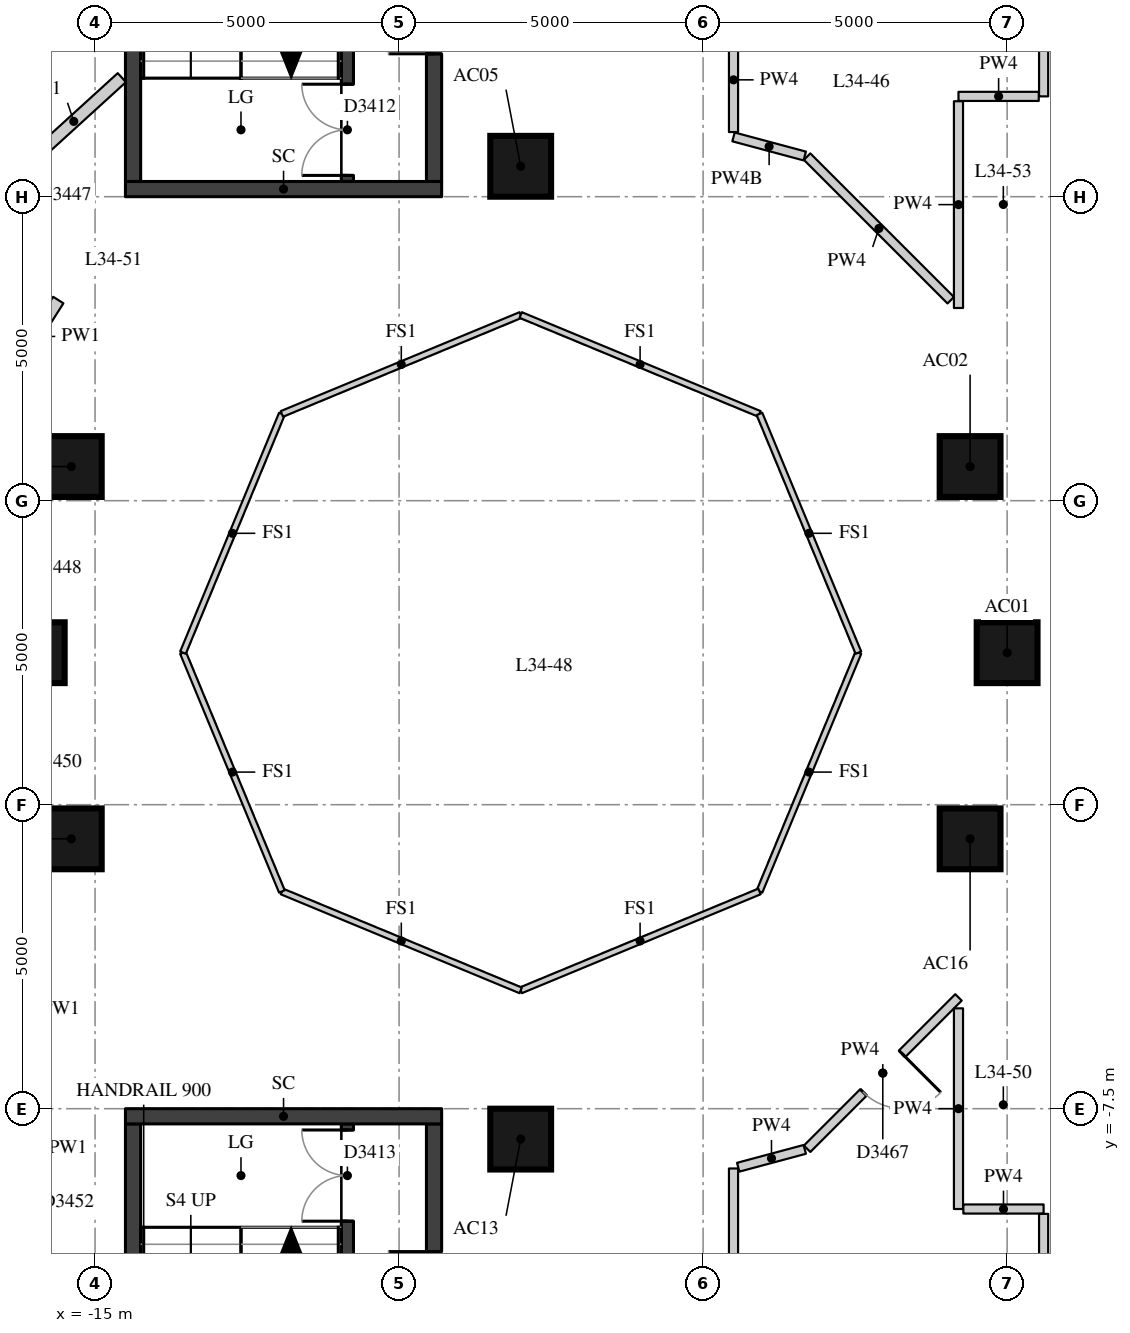
"""IFC4 building model, lengths in metres.
Left out: names, types, materials, properties, quantities, classifications, styles, units other than length and angle.
Written with IfcOpenShell. Run it as: python <this file> out.ifc"""

import sys

from ifc_helpers import new_model, si_unit, direction, frame, frame_2d, origin, origin_2d, place, context, subcontext, project, spatial, rectangle, extrude, element, fill, save


model = new_model("IFC4")
c1 = context("Model", 3, precision=1e-05, world=origin(), true_north=direction((0.0, 1.0)))
c2 = subcontext(c1, "Body", "Model", "MODEL_VIEW")
j1 = project(units=[si_unit("LENGTHUNIT", "METRE"), si_unit("PLANEANGLEUNIT", "RADIAN")], contexts=[c1])
p1 = place(None, origin())
s1 = spatial("IfcSite", under=j1, at=p1, CompositionType="ELEMENT")
p2 = place(p1, origin())
s2 = spatial("IfcBuilding", under=s1, at=p2, CompositionType="ELEMENT")
p3 = place(p2, frame((0.0, 0.0, 121.9)))
s3 = spatial("IfcBuildingStorey", under=s2, at=p3, CompositionType="ELEMENT", Elevation=121.9)
for number, where, z_axis, x_axis in (
    (1, (0.0, 0.0, 0.0), (0.0, 0.0, 1.0), (1.0, 0.0, 0.0)),
    (2, (-0.609, 3.062, 0.0), (0.0, 0.0, 1.0), (1.0, 0.0, 0.0)),
    (3, (-8.0, 8.0, 0.0), (0.0, 0.0, 1.0), (1.0, 0.0, 0.0)),
    (4, (-15.391, 3.062, 0.0), (0.0, 0.0, 1.0), (1.0, 0.0, 0.0)),
    (5, (-16.0, 0.0, 0.0), (0.0, 0.0, 1.0), (1.0, 0.0, 0.0)),
    (6, (-15.391, -3.062, 0.0), (0.0, 0.0, 1.0), (1.0, 0.0, 0.0)),
    (7, (-8.0, -8.0, 0.0), (0.0, 0.0, 1.0), (1.0, 0.0, 0.0)),
    (8, (-0.609, -3.062, 0.0), (0.0, 0.0, 1.0), (1.0, 0.0, 0.0)),
):
    element("IfcColumn", number, at=place(p3, frame(where, z_axis=z_axis, x_axis=x_axis)), inside=s3, PredefinedType="COLUMN", context=c2, shape_type="SweptSolid", body=[
        extrude(rectangle(XDim=1.0, YDim=1.0, at=origin_2d()), origin(), (0.0, 0.0, 1.0), 3.3),
    ])
p4 = place(p3, frame((-10.85, 7.75, 0.0), z_axis=(0.0, 0.0, 1.0), x_axis=(0.0, 1.0, 0.0)))
e9 = element("IfcWall", 9, at=p4, inside=s3, PredefinedType="SHEAR", context=c2, shape_type="SweptSolid", body=[
    extrude(rectangle(XDim=6.0, YDim=0.2, at=frame_2d((3.0, 0.0))), origin(), (0.0, 0.0, 1.0), 3.02),
])
p5 = place(p4, frame((0.1, 0.0, 0.0)))
e10 = element("IfcOpeningElement", 10, at=p5, cuts=e9, PredefinedType="OPENING", context=c2, shape_type="SweptSolid", body=[
    extrude(rectangle(XDim=1.5, YDim=2.1, at=frame_2d((0.75, 1.05))), frame((0.0, 0.11, 0.0), z_axis=(0.0, -1.0, 0.0), x_axis=(1.0, 0.0, 0.0)), (0.0, 0.0, 1.0), 0.22),
])
p6 = place(p3, frame((-10.85, -13.75, 0.0), z_axis=(0.0, 0.0, 1.0), x_axis=(0.0, 1.0, 0.0)))
e11 = element("IfcWall", 11, at=p6, inside=s3, PredefinedType="SHEAR", context=c2, shape_type="SweptSolid", body=[
    extrude(rectangle(XDim=6.0, YDim=0.2, at=frame_2d((3.0, 0.0))), origin(), (0.0, 0.0, 1.0), 3.02),
])
p7 = place(p6, frame((4.4, 0.0, 0.0)))
e12 = element("IfcOpeningElement", 12, at=p7, cuts=e11, PredefinedType="OPENING", context=c2, shape_type="SweptSolid", body=[
    extrude(rectangle(XDim=1.5, YDim=2.1, at=frame_2d((0.75, 1.05))), frame((0.0, 0.11, 0.0), z_axis=(0.0, -1.0, 0.0), x_axis=(1.0, 0.0, 0.0)), (0.0, 0.0, 1.0), 0.22),
])
p8 = place(p3, frame((-14.375, 7.75, -0.28), z_axis=(0.0, 0.0, 1.0), x_axis=(0.0, 1.0, 0.0)))
e13 = element("IfcWall", 13, at=p8, inside=s3, PredefinedType="SHEAR", context=c2, shape_type="SweptSolid", body=[
    extrude(rectangle(XDim=6.0, YDim=0.25, at=frame_2d((3.0, 0.0))), origin(), (0.0, 0.0, 1.0), 3.3),
])
p9 = place(p3, frame((-9.425, 7.75, -0.28), z_axis=(0.0, 0.0, 1.0), x_axis=(0.0, 1.0, 0.0)))
e14 = element("IfcWall", 14, at=p9, inside=s3, PredefinedType="SHEAR", context=c2, shape_type="SweptSolid", body=[
    extrude(rectangle(XDim=6.0, YDim=0.25, at=frame_2d((3.0, 0.0))), origin(), (0.0, 0.0, 1.0), 3.3),
])
p10 = place(p9, frame((2.1, 0.0, 0.28)))
e15 = element("IfcOpeningElement", 15, at=p10, cuts=e14, PredefinedType="OPENING", context=c2, shape_type="SweptSolid", body=[
    extrude(rectangle(XDim=1.5, YDim=2.1, at=frame_2d((0.75, 1.05))), frame((0.0, 0.135, 0.0), z_axis=(0.0, -1.0, 0.0), x_axis=(1.0, 0.0, 0.0)), (0.0, 0.0, 1.0), 0.27),
])
p11 = place(p3, frame((-14.5, 7.625, -0.28), z_axis=(0.0, 0.0, 1.0), x_axis=(1.0, 0.0, 0.0)))
e16 = element("IfcWall", 16, at=p11, inside=s3, PredefinedType="SHEAR", context=c2, shape_type="SweptSolid", body=[
    extrude(rectangle(XDim=5.2, YDim=0.25, at=frame_2d((2.6, 0.0))), origin(), (0.0, 0.0, 1.0), 3.3),
])
p12 = place(p3, frame((-14.375, -13.75, -0.28), z_axis=(0.0, 0.0, 1.0), x_axis=(0.0, 1.0, 0.0)))
e17 = element("IfcWall", 17, at=p12, inside=s3, PredefinedType="SHEAR", context=c2, shape_type="SweptSolid", body=[
    extrude(rectangle(XDim=6.0, YDim=0.25, at=frame_2d((3.0, 0.0))), origin(), (0.0, 0.0, 1.0), 3.3),
])
p13 = place(p3, frame((-9.425, -13.75, -0.28), z_axis=(0.0, 0.0, 1.0), x_axis=(0.0, 1.0, 0.0)))
e18 = element("IfcWall", 18, at=p13, inside=s3, PredefinedType="SHEAR", context=c2, shape_type="SweptSolid", body=[
    extrude(rectangle(XDim=6.0, YDim=0.25, at=frame_2d((3.0, 0.0))), origin(), (0.0, 0.0, 1.0), 3.3),
])
p14 = place(p13, frame((2.4, 0.0, 0.28)))
e19 = element("IfcOpeningElement", 19, at=p14, cuts=e18, PredefinedType="OPENING", context=c2, shape_type="SweptSolid", body=[
    extrude(rectangle(XDim=1.5, YDim=2.1, at=frame_2d((0.75, 1.05))), frame((0.0, 0.135, 0.0), z_axis=(0.0, -1.0, 0.0), x_axis=(1.0, 0.0, 0.0)), (0.0, 0.0, 1.0), 0.27),
])
p15 = place(p3, frame((-14.5, -7.625, -0.28), z_axis=(0.0, 0.0, 1.0), x_axis=(1.0, 0.0, 0.0)))
e20 = element("IfcWall", 20, at=p15, inside=s3, PredefinedType="SHEAR", context=c2, shape_type="SweptSolid", body=[
    extrude(rectangle(XDim=5.2, YDim=0.25, at=frame_2d((2.6, 0.0))), origin(), (0.0, 0.0, 1.0), 3.3),
])
p16 = place(p3, frame((-16.366, 4.604, 0.0), z_axis=(0.0, 0.0, 1.0), x_axis=(0.536775234189, 0.843725279911, 0.0)))
e21 = element("IfcWall", 21, at=p16, inside=s3, PredefinedType="PARTITIONING", context=c2, shape_type="SweptSolid", body=[
    extrude(rectangle(XDim=1.418, YDim=0.2, at=frame_2d((0.709, 0.0))), origin(), (0.0, 0.0, 1.0), 3.02),
])
p17 = place(p3, frame((-16.14, 8.019, 0.0), z_axis=(0.0, 0.0, 1.0), x_axis=(0.739392120684, 0.673275049197, 0.0)))
e22 = element("IfcWall", 22, at=p17, inside=s3, PredefinedType="PARTITIONING", context=c2, shape_type="SweptSolid", body=[
    extrude(rectangle(XDim=2.138, YDim=0.2, at=frame_2d((1.069, 0.0))), origin(), (0.0, 0.0, 1.0), 3.02),
])
p18 = place(p3, frame((0.6, 11.917, 0.0), z_axis=(0.0, 0.0, 1.0), x_axis=(0.0, -1.0, 0.0)))
e23 = element("IfcWall", 23, at=p18, inside=s3, PredefinedType="PARTITIONING", context=c2, shape_type="SweptSolid", body=[
    extrude(rectangle(XDim=2.767, YDim=0.15, at=frame_2d((1.384, 0.0))), origin(), (0.0, 0.0, 1.0), 3.02),
])
p19 = place(p3, frame((0.52, 9.15, 0.0), z_axis=(0.0, 0.0, 1.0), x_axis=(-1.0, 0.0, 0.0)))
e24 = element("IfcWall", 24, at=p19, inside=s3, PredefinedType="PARTITIONING", context=c2, shape_type="SweptSolid", body=[
    extrude(rectangle(XDim=1.32, YDim=0.15, at=frame_2d((0.66, 0.0))), origin(), (0.0, 0.0, 1.0), 3.02),
])
p20 = place(p3, frame((-0.8, 9.07, 0.0), z_axis=(0.0, 0.0, 1.0), x_axis=(0.0, -1.0, 0.0)))
e25 = element("IfcWall", 25, at=p20, inside=s3, PredefinedType="PARTITIONING", context=c2, shape_type="SweptSolid", body=[
    extrude(rectangle(XDim=3.4, YDim=0.15, at=frame_2d((1.7, 0.0))), origin(), (0.0, 0.0, 1.0), 3.02),
])
p21 = place(p3, frame((-0.927, 5.797, 0.0), z_axis=(0.0, 0.0, 1.0), x_axis=(-0.707106781187, 0.707106781187, 0.0)))
e26 = element("IfcWall", 26, at=p21, inside=s3, PredefinedType="PARTITIONING", context=c2, shape_type="SweptSolid", body=[
    extrude(rectangle(XDim=3.341, YDim=0.15, at=frame_2d((1.67, 0.0))), origin(), (0.0, 0.0, 1.0), 3.02),
])
p22 = place(p3, frame((-3.328, 8.169, 0.0), z_axis=(0.0, 0.0, 1.0), x_axis=(-0.965933680277, 0.258789731841, 0.0)))
e27 = element("IfcWall", 27, at=p22, inside=s3, PredefinedType="PARTITIONING", context=c2, shape_type="SweptSolid", body=[
    extrude(rectangle(XDim=1.213, YDim=0.15, at=frame_2d((0.606, 0.0))), origin(), (0.0, 0.0, 1.0), 2.47),
])
p23 = place(p3, frame((-4.5, 8.563, 0.0), z_axis=(0.0, 0.0, 1.0), x_axis=(0.0, 1.0, 0.0)))
e28 = element("IfcWall", 28, at=p23, inside=s3, PredefinedType="PARTITIONING", context=c2, shape_type="SweptSolid", body=[
    extrude(rectangle(XDim=1.717, YDim=0.15, at=frame_2d((0.859, 0.0))), origin(), (0.0, 0.0, 1.0), 3.02),
])
p24 = place(p3, frame((-3.29, -8.159, 0.0), z_axis=(0.0, 0.0, 1.0), x_axis=(0.707106781187, 0.707106781187, 0.0)))
e29 = element("IfcWall", 29, at=p24, inside=s3, PredefinedType="PARTITIONING", context=c2, shape_type="SweptSolid", body=[
    extrude(rectangle(XDim=3.521, YDim=0.15, at=frame_2d((1.76, 0.0))), origin(), (0.0, 0.0, 1.0), 3.02),
])
p25 = place(p24, frame((1.31, 0.0, 0.0)))
e30 = element("IfcOpeningElement", 30, at=p25, cuts=e29, PredefinedType="OPENING", context=c2, shape_type="SweptSolid", body=[
    extrude(rectangle(XDim=0.9, YDim=2.1, at=frame_2d((0.45, 1.05))), frame((0.0, 0.085, 0.0), z_axis=(0.0, -1.0, 0.0), x_axis=(1.0, 0.0, 0.0)), (0.0, 0.0, 1.0), 0.17),
])
p26 = place(p3, frame((-0.8, -5.85, 0.0), z_axis=(0.0, 0.0, 1.0), x_axis=(0.0, -1.0, 0.0)))
e31 = element("IfcWall", 31, at=p26, inside=s3, PredefinedType="PARTITIONING", context=c2, shape_type="SweptSolid", body=[
    extrude(rectangle(XDim=3.3, YDim=0.15, at=frame_2d((1.65, 0.0))), origin(), (0.0, 0.0, 1.0), 3.02),
])
p27 = place(p3, frame((-0.72, -9.15, 0.0), z_axis=(0.0, 0.0, 1.0), x_axis=(1.0, 0.0, 0.0)))
e32 = element("IfcWall", 32, at=p27, inside=s3, PredefinedType="PARTITIONING", context=c2, shape_type="SweptSolid", body=[
    extrude(rectangle(XDim=1.32, YDim=0.15, at=frame_2d((0.66, 0.0))), origin(), (0.0, 0.0, 1.0), 3.02),
])
p28 = place(p3, frame((0.6, -9.23, 0.0), z_axis=(0.0, 0.0, 1.0), x_axis=(0.0, -1.0, 0.0)))
e33 = element("IfcWall", 33, at=p28, inside=s3, PredefinedType="PARTITIONING", context=c2, shape_type="SweptSolid", body=[
    extrude(rectangle(XDim=5.315, YDim=0.15, at=frame_2d((2.657, 0.0))), origin(), (0.0, 0.0, 1.0), 3.02),
])
p29 = place(p3, frame((-4.5, -12.79, 0.0), z_axis=(0.0, 0.0, 1.0), x_axis=(0.0, 1.0, 0.0)))
e34 = element("IfcWall", 34, at=p29, inside=s3, PredefinedType="PARTITIONING", context=c2, shape_type="SweptSolid", body=[
    extrude(rectangle(XDim=4.307, YDim=0.15, at=frame_2d((2.154, 0.0))), origin(), (0.0, 0.0, 1.0), 3.02),
])
p30 = place(p3, frame((-4.423, -8.463, 0.0), z_axis=(0.0, 0.0, 1.0), x_axis=(0.965898042479, 0.258922713439, 0.0)))
e35 = element("IfcWall", 35, at=p30, inside=s3, PredefinedType="PARTITIONING", context=c2, shape_type="SweptSolid", body=[
    extrude(rectangle(XDim=1.133, YDim=0.15, at=frame_2d((0.567, 0.0))), origin(), (0.0, 0.0, 1.0), 3.02),
])
for number, where, z_axis, x_axis in (
    (36, (-2.446, 0.0, 0.0), (0.0, 0.0, 1.0), (-0.383, -0.924, 0.0)),
    (37, (-4.073, -3.927, 0.0), (0.0, 0.0, 1.0), (-0.924, -0.383, 0.0)),
    (38, (-8.0, -5.554, 0.0), (0.0, 0.0, 1.0), (-0.924, 0.383, 0.0)),
    (39, (-11.927, -3.927, 0.0), (0.0, 0.0, 1.0), (-0.383, 0.924, 0.0)),
    (40, (-13.554, 0.0, 0.0), (0.0, 0.0, 1.0), (0.383, 0.924, 0.0)),
    (41, (-11.927, 3.927, 0.0), (0.0, 0.0, 1.0), (0.924, 0.383, 0.0)),
    (42, (-8.0, 5.554, 0.0), (0.0, 0.0, 1.0), (0.924, -0.383, 0.0)),
    (43, (-4.073, 3.927, 0.0), (0.0, 0.0, 1.0), (0.383, -0.924, 0.0)),
):
    element("IfcWall", number, at=place(p3, frame(where, z_axis=z_axis, x_axis=x_axis)), inside=s3, PredefinedType="PARTITIONING", context=c2, shape_type="SweptSolid", body=[
        extrude(rectangle(XDim=4.251, YDim=0.1, at=frame_2d((2.125, 0.0))), origin(), (0.0, 0.0, 1.0), 3.02),
    ])
p31 = place(p5, origin())
e44 = element("IfcDoor", 44, at=p31, inside=s3, OperationType="DOUBLE_DOOR_SINGLE_SWING", PredefinedType="DOOR", context=c2, shape_type="SweptSolid", body=[
    extrude(rectangle(XDim=1.5, YDim=2.1, at=frame_2d((0.75, 1.05))), frame((0.0, 0.025, 0.0), z_axis=(0.0, -1.0, 0.0), x_axis=(1.0, 0.0, 0.0)), (0.0, 0.0, 1.0), 0.05),
])
fill(e10, e44)
p32 = place(p7, origin())
e45 = element("IfcDoor", 45, at=p32, inside=s3, OperationType="DOUBLE_DOOR_SINGLE_SWING", PredefinedType="DOOR", context=c2, shape_type="SweptSolid", body=[
    extrude(rectangle(XDim=1.5, YDim=2.1, at=frame_2d((0.75, 1.05))), frame((0.0, 0.025, 0.0), z_axis=(0.0, -1.0, 0.0), x_axis=(1.0, 0.0, 0.0)), (0.0, 0.0, 1.0), 0.05),
])
fill(e12, e45)
p33 = place(p10, origin())
e46 = element("IfcDoor", 46, at=p33, inside=s3, OperationType="DOUBLE_DOOR_SINGLE_SWING", PredefinedType="DOOR", context=c2, shape_type="SweptSolid", body=[
    extrude(rectangle(XDim=1.5, YDim=2.1, at=frame_2d((0.75, 1.05))), frame((0.0, 0.025, 0.0), z_axis=(0.0, -1.0, 0.0), x_axis=(1.0, 0.0, 0.0)), (0.0, 0.0, 1.0), 0.05),
])
fill(e15, e46)
p34 = place(p14, origin())
e47 = element("IfcDoor", 47, at=p34, inside=s3, OperationType="DOUBLE_DOOR_SINGLE_SWING", PredefinedType="DOOR", context=c2, shape_type="SweptSolid", body=[
    extrude(rectangle(XDim=1.5, YDim=2.1, at=frame_2d((0.75, 1.05))), frame((0.0, 0.025, 0.0), z_axis=(0.0, -1.0, 0.0), x_axis=(1.0, 0.0, 0.0)), (0.0, 0.0, 1.0), 0.05),
])
fill(e19, e47)
p35 = place(p25, origin())
e48 = element("IfcDoor", 48, at=p35, inside=s3, OperationType="SINGLE_SWING_LEFT", PredefinedType="DOOR", context=c2, shape_type="SweptSolid", body=[
    extrude(rectangle(XDim=0.9, YDim=2.1, at=frame_2d((0.45, 1.05))), frame((0.0, 0.025, 0.0), z_axis=(0.0, -1.0, 0.0), x_axis=(1.0, 0.0, 0.0)), (0.0, 0.0, 1.0), 0.05),
])
fill(e30, e48)
save(model, sys.argv[1])
